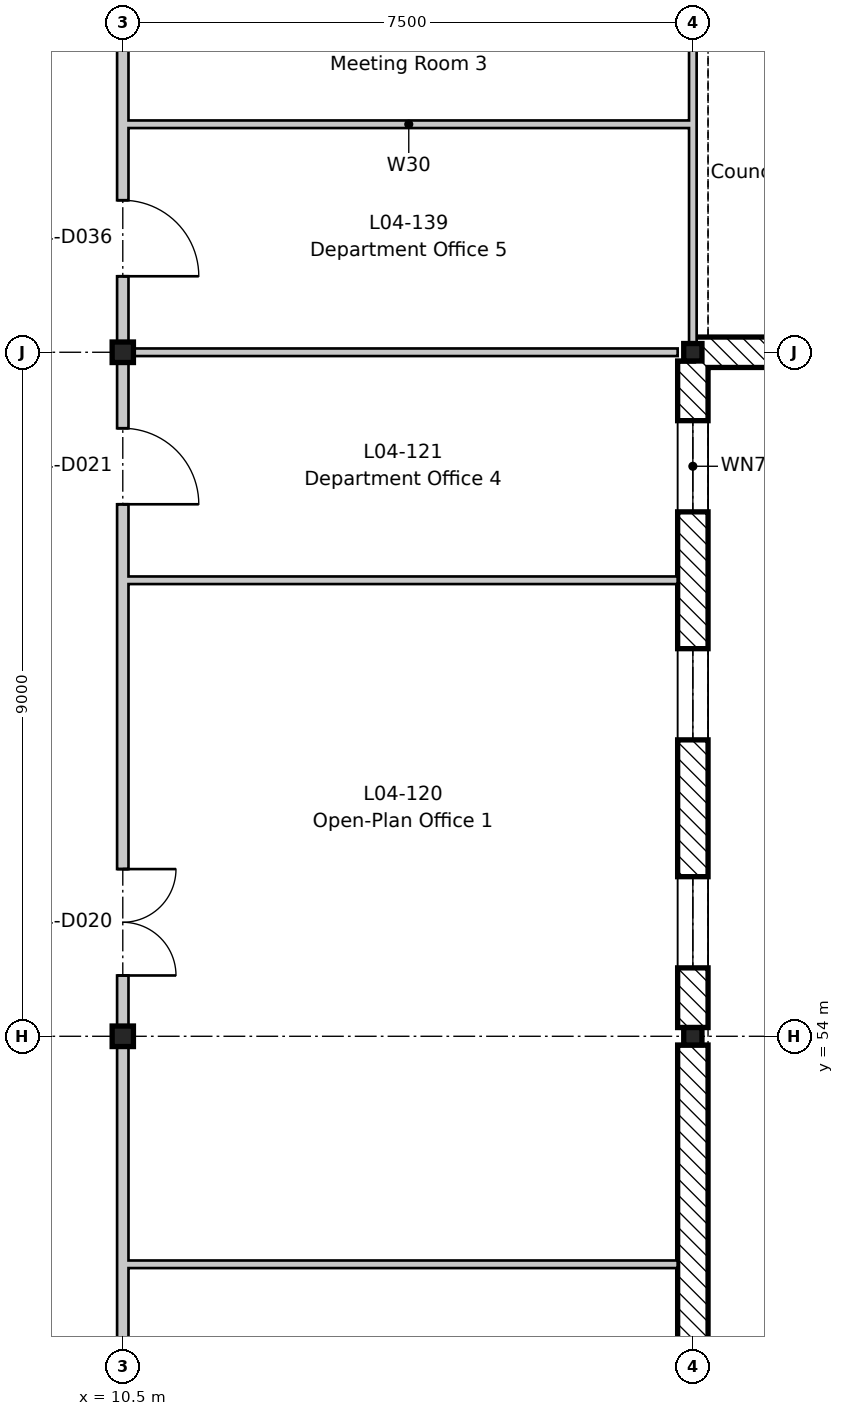
"""IFC4 building model, lengths in metres.
Left out: names, types, materials, properties, quantities, classifications, styles, units other than length and angle.
Written with IfcOpenShell. Run it as: python <this file> out.ifc"""

import sys

from ifc_helpers import new_model, si_unit, direction, frame, frame_2d, origin, origin_2d, place, context, subcontext, project, spatial, rectangle, i_section, extrude, element, fill, save


model = new_model("IFC4")
c1 = context("Model", 3, precision=1e-05, world=origin(), true_north=direction((0.0, 1.0)))
c2 = subcontext(c1, "Body", "Model", "MODEL_VIEW")
j1 = project(units=[si_unit("LENGTHUNIT", "METRE"), si_unit("PLANEANGLEUNIT", "RADIAN")], contexts=[c1])
p1 = place(None, origin())
s1 = spatial("IfcSite", under=j1, at=p1, CompositionType="ELEMENT")
p2 = place(p1, origin())
s2 = spatial("IfcBuilding", under=s1, at=p2, CompositionType="ELEMENT")
p3 = place(p2, frame((0.0, 0.0, 18.6)))
s3 = spatial("IfcBuildingStorey", under=s2, at=p3, CompositionType="ELEMENT", Elevation=18.6)
for number, where, z_axis, x_axis in (
    (1, (10.5, 54.0, -0.2), (0.0, 0.0, 1.0), (1.0, 0.0, 0.0)),
    (2, (10.5, 63.0, -0.2), (0.0, 0.0, 1.0), (1.0, 0.0, 0.0)),
):
    element("IfcColumn", number, at=place(p3, frame(where, z_axis=z_axis, x_axis=x_axis)), inside=s3, PredefinedType="COLUMN", context=c2, shape_type="SweptSolid", body=[
        extrude(i_section(OverallWidth=0.28, OverallDepth=0.27, WebThickness=0.008, FlangeThickness=0.013, FilletRadius=0.024, at=origin_2d()), origin(), (0.0, 0.0, 1.0), 4.2),
    ])
for number, where, z_axis, x_axis in (
    (3, (18.0, 54.0, -0.2), (0.0, 0.0, 1.0), (1.0, 0.0, 0.0)),
    (4, (18.0, 63.0, -0.2), (0.0, 0.0, 1.0), (1.0, 0.0, 0.0)),
):
    element("IfcColumn", number, at=place(p3, frame(where, z_axis=z_axis, x_axis=x_axis)), inside=s3, PredefinedType="COLUMN", context=c2, shape_type="SweptSolid", body=[
        extrude(i_section(OverallWidth=0.24, OverallDepth=0.23, WebThickness=0.008, FlangeThickness=0.012, FilletRadius=0.021, at=origin_2d()), origin(), (0.0, 0.0, 1.0), 4.2),
    ])
p4 = place(p3, frame((18.0, 53.885, 0.0), z_axis=(0.0, 0.0, 1.0), x_axis=(0.0, -1.0, 0.0)))
e5 = element("IfcWall", 5, at=p4, inside=s3, PredefinedType="STANDARD", context=c2, shape_type="SweptSolid", body=[
    extrude(rectangle(XDim=8.77, YDim=0.4, at=frame_2d((4.385, 0.0))), origin(), (0.0, 0.0, 1.0), 3.6),
])
p5 = place(p3, frame((18.0, 62.885, 0.0), z_axis=(0.0, 0.0, 1.0), x_axis=(0.0, -1.0, 0.0)))
e6 = element("IfcWall", 6, at=p5, inside=s3, PredefinedType="STANDARD", context=c2, shape_type="SweptSolid", body=[
    extrude(rectangle(XDim=8.77, YDim=0.4, at=frame_2d((4.385, 0.0))), origin(), (0.0, 0.0, 1.0), 3.6),
])
p6 = place(p5, frame((6.785, 0.0, 0.9)))
e7 = element("IfcOpeningElement", 7, at=p6, cuts=e6, PredefinedType="OPENING", context=c2, shape_type="SweptSolid", body=[
    extrude(rectangle(XDim=1.2, YDim=2.4, at=frame_2d((0.6, 1.2))), frame((0.0, 0.21, 0.0), z_axis=(0.0, -1.0, 0.0), x_axis=(1.0, 0.0, 0.0)), (0.0, 0.0, 1.0), 0.42),
])
p7 = place(p5, frame((3.785, 0.0, 0.9)))
e8 = element("IfcOpeningElement", 8, at=p7, cuts=e6, PredefinedType="OPENING", context=c2, shape_type="SweptSolid", body=[
    extrude(rectangle(XDim=1.2, YDim=2.4, at=frame_2d((0.6, 1.2))), frame((0.0, 0.21, 0.0), z_axis=(0.0, -1.0, 0.0), x_axis=(1.0, 0.0, 0.0)), (0.0, 0.0, 1.0), 0.42),
])
p8 = place(p5, frame((0.785, 0.0, 0.9)))
e9 = element("IfcOpeningElement", 9, at=p8, cuts=e6, PredefinedType="OPENING", context=c2, shape_type="SweptSolid", body=[
    extrude(rectangle(XDim=1.2, YDim=2.4, at=frame_2d((0.6, 1.2))), frame((0.0, 0.21, 0.0), z_axis=(0.0, -1.0, 0.0), x_axis=(1.0, 0.0, 0.0)), (0.0, 0.0, 1.0), 0.42),
])
p9 = place(p3, frame((26.992, 63.0, 0.0), z_axis=(0.0, 0.0, 1.0), x_axis=(-1.0, 0.0, 0.0)))
e10 = element("IfcWall", 10, at=p9, inside=s3, PredefinedType="STANDARD", context=c2, shape_type="SweptSolid", body=[
    extrude(rectangle(XDim=8.983, YDim=0.4, at=frame_2d((4.491, 0.0))), origin(), (0.0, 0.0, 1.0), 3.55),
])
p10 = place(p9, frame((7.117, 0.0, 1.5)))
e11 = element("IfcOpeningElement", 11, at=p10, cuts=e10, PredefinedType="OPENING", context=c2, shape_type="SweptSolid", body=[
    extrude(rectangle(XDim=0.75, YDim=1.2, at=frame_2d((0.375, 0.6))), frame((0.0, 0.21, 0.0), z_axis=(0.0, -1.0, 0.0), x_axis=(1.0, 0.0, 0.0)), (0.0, 0.0, 1.0), 0.42),
])
p11 = place(p9, frame((4.117, 0.0, 1.5)))
e12 = element("IfcOpeningElement", 12, at=p11, cuts=e10, PredefinedType="OPENING", context=c2, shape_type="SweptSolid", body=[
    extrude(rectangle(XDim=0.75, YDim=1.2, at=frame_2d((0.375, 0.6))), frame((0.0, 0.21, 0.0), z_axis=(0.0, -1.0, 0.0), x_axis=(1.0, 0.0, 0.0)), (0.0, 0.0, 1.0), 0.42),
])
p12 = place(p9, frame((1.117, 0.0, 1.5)))
e13 = element("IfcOpeningElement", 13, at=p12, cuts=e10, PredefinedType="OPENING", context=c2, shape_type="SweptSolid", body=[
    extrude(rectangle(XDim=0.75, YDim=1.2, at=frame_2d((0.375, 0.6))), frame((0.0, 0.21, 0.0), z_axis=(0.0, -1.0, 0.0), x_axis=(1.0, 0.0, 0.0)), (0.0, 0.0, 1.0), 0.42),
])
for number, where, z_axis, x_axis in (
    (14, (10.575, 51.0, 0.0), (0.0, 0.0, 1.0), (1.0, 0.0, 0.0)),
    (15, (10.575, 60.0, 0.0), (0.0, 0.0, 1.0), (1.0, 0.0, 0.0)),
):
    element("IfcWall", number, at=place(p3, frame(where, z_axis=z_axis, x_axis=x_axis)), inside=s3, PredefinedType="PARTITIONING", context=c2, shape_type="SweptSolid", body=[
        extrude(rectangle(XDim=7.225, YDim=0.1, at=frame_2d((3.613, 0.0))), origin(), (0.0, 0.0, 1.0), 4.0),
    ])
p13 = place(p3, frame((10.575, 63.0, 0.0), z_axis=(0.0, 0.0, 1.0), x_axis=(1.0, 0.0, 0.0)))
e16 = element("IfcWall", 16, at=p13, inside=s3, PredefinedType="PARTITIONING", context=c2, shape_type="SweptSolid", body=[
    extrude(rectangle(XDim=7.225, YDim=0.1, at=frame_2d((3.613, 0.0))), origin(), (0.0, 0.0, 1.0), 3.65),
])
p14 = place(p3, frame((10.5, -8.8, 0.0), z_axis=(0.0, 0.0, 1.0), x_axis=(0.0, 1.0, 0.0)))
e17 = element("IfcWall", 17, at=p14, inside=s3, PredefinedType="PARTITIONING", context=c2, shape_type="SweptSolid", body=[
    extrude(rectangle(XDim=79.3, YDim=0.15, at=frame_2d((39.65, 0.0))), origin(), (0.0, 0.0, 1.0), 3.48),
])
p15 = place(p14, frame((2.3, 0.0, 0.0)))
e18 = element("IfcOpeningElement", 18, at=p15, cuts=e17, PredefinedType="OPENING", context=c2, shape_type="SweptSolid", body=[
    extrude(rectangle(XDim=1.0, YDim=2.1, at=frame_2d((0.5, 1.05))), frame((0.0, 0.085, 0.0), z_axis=(0.0, -1.0, 0.0), x_axis=(1.0, 0.0, 0.0)), (0.0, 0.0, 1.0), 0.17),
])
p16 = place(p14, frame((9.55, 0.0, 0.0)))
e19 = element("IfcOpeningElement", 19, at=p16, cuts=e17, PredefinedType="OPENING", context=c2, shape_type="SweptSolid", body=[
    extrude(rectangle(XDim=1.0, YDim=2.1, at=frame_2d((0.5, 1.05))), frame((0.0, 0.085, 0.0), z_axis=(0.0, -1.0, 0.0), x_axis=(1.0, 0.0, 0.0)), (0.0, 0.0, 1.0), 0.17),
])
p17 = place(p14, frame((15.6, 0.0, 0.0)))
e20 = element("IfcOpeningElement", 20, at=p17, cuts=e17, PredefinedType="OPENING", context=c2, shape_type="SweptSolid", body=[
    extrude(rectangle(XDim=1.4, YDim=2.1, at=frame_2d((0.7, 1.05))), frame((0.0, 0.085, 0.0), z_axis=(0.0, -1.0, 0.0), x_axis=(1.0, 0.0, 0.0)), (0.0, 0.0, 1.0), 0.17),
])
p18 = place(p14, frame((21.8, 0.0, 0.0)))
e21 = element("IfcOpeningElement", 21, at=p18, cuts=e17, PredefinedType="OPENING", context=c2, shape_type="SweptSolid", body=[
    extrude(rectangle(XDim=1.0, YDim=2.1, at=frame_2d((0.5, 1.05))), frame((0.0, 0.085, 0.0), z_axis=(0.0, -1.0, 0.0), x_axis=(1.0, 0.0, 0.0)), (0.0, 0.0, 1.0), 0.17),
])
p19 = place(p14, frame((24.8, 0.0, 0.0)))
e22 = element("IfcOpeningElement", 22, at=p19, cuts=e17, PredefinedType="OPENING", context=c2, shape_type="SweptSolid", body=[
    extrude(rectangle(XDim=1.0, YDim=2.1, at=frame_2d((0.5, 1.05))), frame((0.0, 0.085, 0.0), z_axis=(0.0, -1.0, 0.0), x_axis=(1.0, 0.0, 0.0)), (0.0, 0.0, 1.0), 0.17),
])
p20 = place(p14, frame((30.6, 0.0, 0.0)))
e23 = element("IfcOpeningElement", 23, at=p20, cuts=e17, PredefinedType="OPENING", context=c2, shape_type="SweptSolid", body=[
    extrude(rectangle(XDim=1.4, YDim=2.1, at=frame_2d((0.7, 1.05))), frame((0.0, 0.085, 0.0), z_axis=(0.0, -1.0, 0.0), x_axis=(1.0, 0.0, 0.0)), (0.0, 0.0, 1.0), 0.17),
])
p21 = place(p14, frame((38.3, 0.0, 0.0)))
e24 = element("IfcOpeningElement", 24, at=p21, cuts=e17, PredefinedType="OPENING", context=c2, shape_type="SweptSolid", body=[
    extrude(rectangle(XDim=1.0, YDim=2.1, at=frame_2d((0.5, 1.05))), frame((0.0, 0.085, 0.0), z_axis=(0.0, -1.0, 0.0), x_axis=(1.0, 0.0, 0.0)), (0.0, 0.0, 1.0), 0.17),
])
p22 = place(p14, frame((42.8, 0.0, 0.0)))
e25 = element("IfcOpeningElement", 25, at=p22, cuts=e17, PredefinedType="OPENING", context=c2, shape_type="SweptSolid", body=[
    extrude(rectangle(XDim=1.0, YDim=2.1, at=frame_2d((0.5, 1.05))), frame((0.0, 0.085, 0.0), z_axis=(0.0, -1.0, 0.0), x_axis=(1.0, 0.0, 0.0)), (0.0, 0.0, 1.0), 0.17),
])
p23 = place(p14, frame((45.8, 0.0, 0.0)))
e26 = element("IfcOpeningElement", 26, at=p23, cuts=e17, PredefinedType="OPENING", context=c2, shape_type="SweptSolid", body=[
    extrude(rectangle(XDim=1.0, YDim=2.1, at=frame_2d((0.5, 1.05))), frame((0.0, 0.085, 0.0), z_axis=(0.0, -1.0, 0.0), x_axis=(1.0, 0.0, 0.0)), (0.0, 0.0, 1.0), 0.17),
])
p24 = place(p14, frame((50.3, 0.0, 0.0)))
e27 = element("IfcOpeningElement", 27, at=p24, cuts=e17, PredefinedType="OPENING", context=c2, shape_type="SweptSolid", body=[
    extrude(rectangle(XDim=1.0, YDim=2.1, at=frame_2d((0.5, 1.05))), frame((0.0, 0.085, 0.0), z_axis=(0.0, -1.0, 0.0), x_axis=(1.0, 0.0, 0.0)), (0.0, 0.0, 1.0), 0.17),
])
p25 = place(p14, frame((54.8, 0.0, 0.0)))
e28 = element("IfcOpeningElement", 28, at=p25, cuts=e17, PredefinedType="OPENING", context=c2, shape_type="SweptSolid", body=[
    extrude(rectangle(XDim=1.0, YDim=2.1, at=frame_2d((0.5, 1.05))), frame((0.0, 0.085, 0.0), z_axis=(0.0, -1.0, 0.0), x_axis=(1.0, 0.0, 0.0)), (0.0, 0.0, 1.0), 0.17),
])
p26 = place(p14, frame((57.8, 0.0, 0.0)))
e29 = element("IfcOpeningElement", 29, at=p26, cuts=e17, PredefinedType="OPENING", context=c2, shape_type="SweptSolid", body=[
    extrude(rectangle(XDim=1.0, YDim=2.1, at=frame_2d((0.5, 1.05))), frame((0.0, 0.085, 0.0), z_axis=(0.0, -1.0, 0.0), x_axis=(1.0, 0.0, 0.0)), (0.0, 0.0, 1.0), 0.17),
])
p27 = place(p14, frame((63.6, 0.0, 0.0)))
e30 = element("IfcOpeningElement", 30, at=p27, cuts=e17, PredefinedType="OPENING", context=c2, shape_type="SweptSolid", body=[
    extrude(rectangle(XDim=1.4, YDim=2.1, at=frame_2d((0.7, 1.05))), frame((0.0, 0.085, 0.0), z_axis=(0.0, -1.0, 0.0), x_axis=(1.0, 0.0, 0.0)), (0.0, 0.0, 1.0), 0.17),
])
p28 = place(p14, frame((69.8, 0.0, 0.0)))
e31 = element("IfcOpeningElement", 31, at=p28, cuts=e17, PredefinedType="OPENING", context=c2, shape_type="SweptSolid", body=[
    extrude(rectangle(XDim=1.0, YDim=2.1, at=frame_2d((0.5, 1.05))), frame((0.0, 0.085, 0.0), z_axis=(0.0, -1.0, 0.0), x_axis=(1.0, 0.0, 0.0)), (0.0, 0.0, 1.0), 0.17),
])
p29 = place(p14, frame((72.8, 0.0, 0.0)))
e32 = element("IfcOpeningElement", 32, at=p29, cuts=e17, PredefinedType="OPENING", context=c2, shape_type="SweptSolid", body=[
    extrude(rectangle(XDim=1.0, YDim=2.1, at=frame_2d((0.5, 1.05))), frame((0.0, 0.085, 0.0), z_axis=(0.0, -1.0, 0.0), x_axis=(1.0, 0.0, 0.0)), (0.0, 0.0, 1.0), 0.17),
])
p30 = place(p3, frame((10.575, 66.0, 0.0), z_axis=(0.0, 0.0, 1.0), x_axis=(1.0, 0.0, 0.0)))
e33 = element("IfcWall", 33, at=p30, inside=s3, PredefinedType="PARTITIONING", context=c2, shape_type="SweptSolid", body=[
    extrude(rectangle(XDim=7.375, YDim=0.1, at=frame_2d((3.688, 0.0))), origin(), (0.0, 0.0, 1.0), 4.0),
])
p31 = place(p3, frame((18.0, 63.075, 0.0), z_axis=(0.0, 0.0, 1.0), x_axis=(0.0, 1.0, 0.0)))
e34 = element("IfcWall", 34, at=p31, inside=s3, PredefinedType="PARTITIONING", context=c2, shape_type="SweptSolid", body=[
    extrude(rectangle(XDim=7.35, YDim=0.1, at=frame_2d((3.675, 0.0))), origin(), (0.0, 0.0, 1.0), 3.58),
])
p32 = place(p6, origin())
e35 = element("IfcWindow", 35, at=p32, inside=s3, PartitioningType="SINGLE_PANEL", PredefinedType="WINDOW", context=c2, shape_type="SweptSolid", body=[
    extrude(rectangle(XDim=1.2, YDim=2.4, at=frame_2d((0.6, 1.2))), frame((0.0, -0.12, 0.0), z_axis=(0.0, -1.0, 0.0), x_axis=(1.0, 0.0, 0.0)), (0.0, 0.0, 1.0), 0.06),
])
fill(e7, e35)
p33 = place(p7, origin())
e36 = element("IfcWindow", 36, at=p33, inside=s3, PartitioningType="SINGLE_PANEL", PredefinedType="WINDOW", context=c2, shape_type="SweptSolid", body=[
    extrude(rectangle(XDim=1.2, YDim=2.4, at=frame_2d((0.6, 1.2))), frame((0.0, -0.12, 0.0), z_axis=(0.0, -1.0, 0.0), x_axis=(1.0, 0.0, 0.0)), (0.0, 0.0, 1.0), 0.06),
])
fill(e8, e36)
p34 = place(p8, origin())
e37 = element("IfcWindow", 37, at=p34, inside=s3, PartitioningType="SINGLE_PANEL", PredefinedType="WINDOW", context=c2, shape_type="SweptSolid", body=[
    extrude(rectangle(XDim=1.2, YDim=2.4, at=frame_2d((0.6, 1.2))), frame((0.0, -0.12, 0.0), z_axis=(0.0, -1.0, 0.0), x_axis=(1.0, 0.0, 0.0)), (0.0, 0.0, 1.0), 0.06),
])
fill(e9, e37)
p35 = place(p27, frame((1.4, 0.0, 0.0), z_axis=(0.0, 0.0, 1.0), x_axis=(-1.0, 0.0, 0.0)))
e38 = element("IfcDoor", 38, at=p35, inside=s3, OperationType="DOUBLE_DOOR_SINGLE_SWING", PredefinedType="DOOR", context=c2, shape_type="SweptSolid", body=[
    extrude(rectangle(XDim=1.4, YDim=2.1, at=frame_2d((0.7, 1.05))), frame((0.0, 0.025, 0.0), z_axis=(0.0, -1.0, 0.0), x_axis=(1.0, 0.0, 0.0)), (0.0, 0.0, 1.0), 0.05),
])
fill(e30, e38)
p36 = place(p28, frame((1.0, 0.0, 0.0), z_axis=(0.0, 0.0, 1.0), x_axis=(-1.0, 0.0, 0.0)))
e39 = element("IfcDoor", 39, at=p36, inside=s3, OperationType="SINGLE_SWING_RIGHT", PredefinedType="DOOR", context=c2, shape_type="SweptSolid", body=[
    extrude(rectangle(XDim=1.0, YDim=2.1, at=frame_2d((0.5, 1.05))), frame((0.0, 0.025, 0.0), z_axis=(0.0, -1.0, 0.0), x_axis=(1.0, 0.0, 0.0)), (0.0, 0.0, 1.0), 0.05),
])
fill(e31, e39)
p37 = place(p29, frame((1.0, 0.0, 0.0), z_axis=(0.0, 0.0, 1.0), x_axis=(-1.0, 0.0, 0.0)))
e40 = element("IfcDoor", 40, at=p37, inside=s3, OperationType="SINGLE_SWING_RIGHT", PredefinedType="DOOR", context=c2, shape_type="SweptSolid", body=[
    extrude(rectangle(XDim=1.0, YDim=2.1, at=frame_2d((0.5, 1.05))), frame((0.0, 0.025, 0.0), z_axis=(0.0, -1.0, 0.0), x_axis=(1.0, 0.0, 0.0)), (0.0, 0.0, 1.0), 0.05),
])
fill(e32, e40)
save(model, sys.argv[1])
